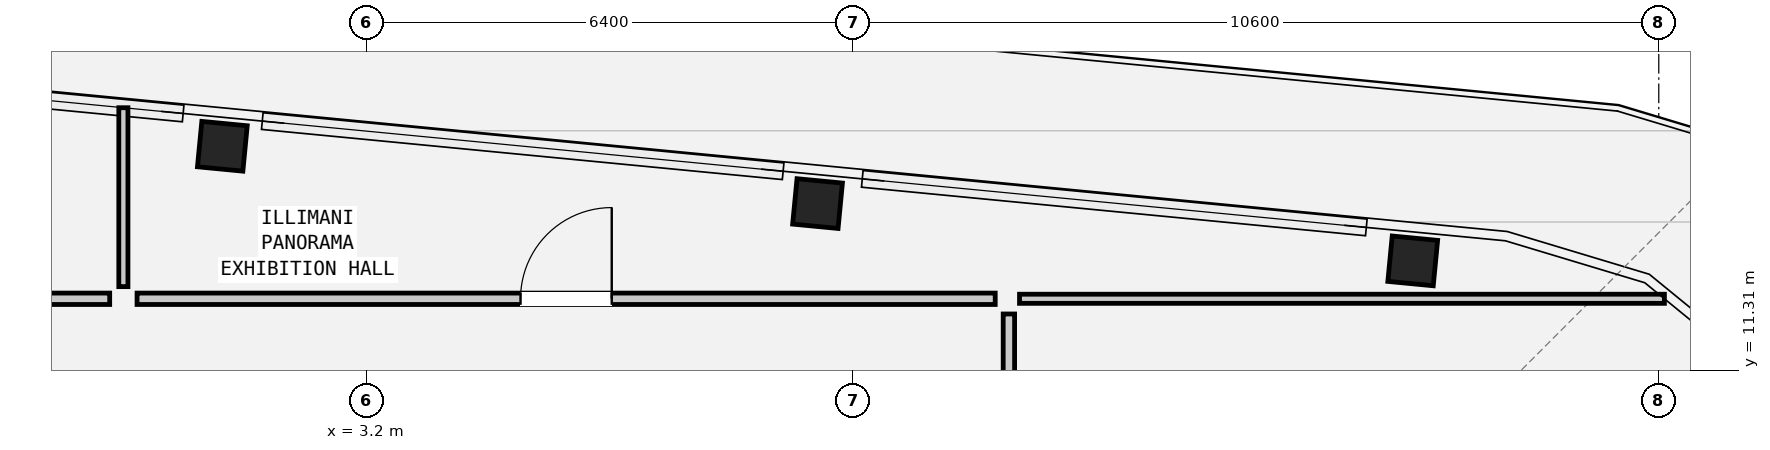
"""IFC4 building model, lengths in metres.
Left out: names, types, materials, properties, quantities, classifications, styles, units other than length and angle.
Written with IfcOpenShell. Run it as: python <this file> out.ifc"""

import sys

from ifc_helpers import new_model, si_unit, direction, frame, frame_2d, origin, origin_2d, place, context, subcontext, project, spatial, rectangle, hollow_rectangle, extrude, element, fill, save


model = new_model("IFC4")
c1 = context("Model", 3, precision=1e-05, world=origin(), true_north=direction((0.0, 1.0)))
c2 = subcontext(c1, "Body", "Model", "MODEL_VIEW")
j1 = project(units=[si_unit("LENGTHUNIT", "METRE"), si_unit("PLANEANGLEUNIT", "RADIAN")], contexts=[c1])
p1 = place(None, origin())
s1 = spatial("IfcSite", under=j1, at=p1, CompositionType="ELEMENT")
p2 = place(p1, origin())
s2 = spatial("IfcBuilding", under=s1, at=p2, CompositionType="ELEMENT")
p3 = place(p2, frame((0.0, 0.0, 280.55)))
s3 = spatial("IfcBuildingStorey", under=s2, at=p3, CompositionType="ELEMENT", Elevation=280.55)
for number, where, z_axis, x_axis in (
    (1, (16.963, 12.749, 0.0), (0.0, 0.0, 1.0), (0.995, -0.096, 0.0)),
    (2, (9.133, 13.502, 0.0), (0.0, 0.0, 1.0), (0.995, -0.096, 0.0)),
    (3, (1.302, 14.256, 0.0), (0.0, 0.0, 1.0), (0.995, -0.096, 0.0)),
):
    element("IfcColumn", number, at=place(p3, frame(where, z_axis=z_axis, x_axis=x_axis)), inside=s3, PredefinedType="COLUMN", context=c2, shape_type="SweptSolid", body=[
        extrude(hollow_rectangle(XDim=0.6, YDim=0.6, WallThickness=0.04, at=origin_2d()), origin(), (0.0, 0.0, 1.0), 4.35),
    ])
p4 = place(p3, frame((11.79, 12.25, 0.0), z_axis=(0.0, 0.0, 1.0), x_axis=(1.0, 0.0, 0.0)))
e4 = element("IfcWall", 4, at=p4, inside=s3, PredefinedType="PARTITIONING", context=c2, shape_type="SweptSolid", body=[
    extrude(rectangle(XDim=8.484, YDim=0.12, at=frame_2d((4.242, 0.0))), origin(), (0.0, 0.0, 1.0), 2.25),
])
p5 = place(p3, frame((0.0, 12.41, 0.0), z_axis=(0.0, 0.0, 1.0), x_axis=(0.0, 1.0, 0.0)))
e5 = element("IfcWall", 5, at=p5, inside=s3, PredefinedType="PARTITIONING", context=c2, shape_type="SweptSolid", body=[
    extrude(rectangle(XDim=2.354, YDim=0.12, at=frame_2d((1.177, 0.0))), origin(), (0.0, 0.0, 1.0), 2.25),
])
p6 = place(p3, frame((-11.12, 12.25, 0.0), z_axis=(0.0, 0.0, 1.0), x_axis=(1.0, 0.0, 0.0)))
e6 = element("IfcWall", 6, at=p6, inside=s3, PredefinedType="PARTITIONING", context=c2, shape_type="SweptSolid", body=[
    extrude(rectangle(XDim=10.94, YDim=0.15, at=frame_2d((5.47, 0.0))), origin(), (0.0, 0.0, 1.0), 4.07),
])
p7 = place(p6, frame((8.371, 0.0, 0.0)))
e7 = element("IfcOpeningElement", 7, at=p7, cuts=e6, PredefinedType="OPENING", context=c2, shape_type="SweptSolid", body=[
    extrude(rectangle(XDim=1.2, YDim=2.1, at=frame_2d((0.6, 1.05))), frame((0.0, 0.087, 0.0), z_axis=(0.0, -1.0, 0.0), x_axis=(1.0, 0.0, 0.0)), (0.0, 0.0, 1.0), 0.174),
])
p8 = place(p3, frame((0.18, 12.25, 0.0), z_axis=(0.0, 0.0, 1.0), x_axis=(1.0, 0.0, 0.0)))
e8 = element("IfcWall", 8, at=p8, inside=s3, PredefinedType="PARTITIONING", context=c2, shape_type="SweptSolid", body=[
    extrude(rectangle(XDim=11.29, YDim=0.15, at=frame_2d((5.645, 0.0))), origin(), (0.0, 0.0, 1.0), 2.25),
])
p9 = place(p8, frame((5.045, 0.0, 0.0)))
e9 = element("IfcOpeningElement", 9, at=p9, cuts=e8, PredefinedType="OPENING", context=c2, shape_type="SweptSolid", body=[
    extrude(rectangle(XDim=1.2, YDim=2.1, at=frame_2d((0.6, 1.05))), frame((0.0, 0.087, 0.0), z_axis=(0.0, -1.0, 0.0), x_axis=(1.0, 0.0, 0.0)), (0.0, 0.0, 1.0), 0.174),
])
p10 = place(p3, frame((11.65, 3.8, 0.0), z_axis=(0.0, 0.0, 1.0), x_axis=(0.0, 1.0, 0.0)))
e10 = element("IfcWall", 10, at=p10, inside=s3, PredefinedType="PARTITIONING", context=c2, shape_type="SweptSolid", body=[
    extrude(rectangle(XDim=8.25, YDim=0.15, at=frame_2d((4.125, 0.0))), origin(), (0.0, 0.0, 1.0), 4.07),
])
p11 = place(p10, frame((3.525, 0.0, 0.0)))
e11 = element("IfcOpeningElement", 11, at=p11, cuts=e10, PredefinedType="OPENING", context=c2, shape_type="SweptSolid", body=[
    extrude(rectangle(XDim=1.2, YDim=2.1, at=frame_2d((0.6, 1.05))), frame((0.0, 0.087, 0.0), z_axis=(0.0, -1.0, 0.0), x_axis=(1.0, 0.0, 0.0)), (0.0, 0.0, 1.0), 0.174),
])
p12 = place(p9, origin())
e12 = element("IfcDoor", 12, at=p12, inside=s3, OperationType="SINGLE_SWING_RIGHT", PredefinedType="DOOR", context=c2, shape_type="SweptSolid", body=[
    extrude(rectangle(XDim=1.2, YDim=2.1, at=frame_2d((0.6, 1.05))), frame((0.0, 0.025, 0.0), z_axis=(0.0, -1.0, 0.0), x_axis=(1.0, 0.0, 0.0)), (0.0, 0.0, 1.0), 0.05),
])
fill(e9, e12)
save(model, sys.argv[1])
